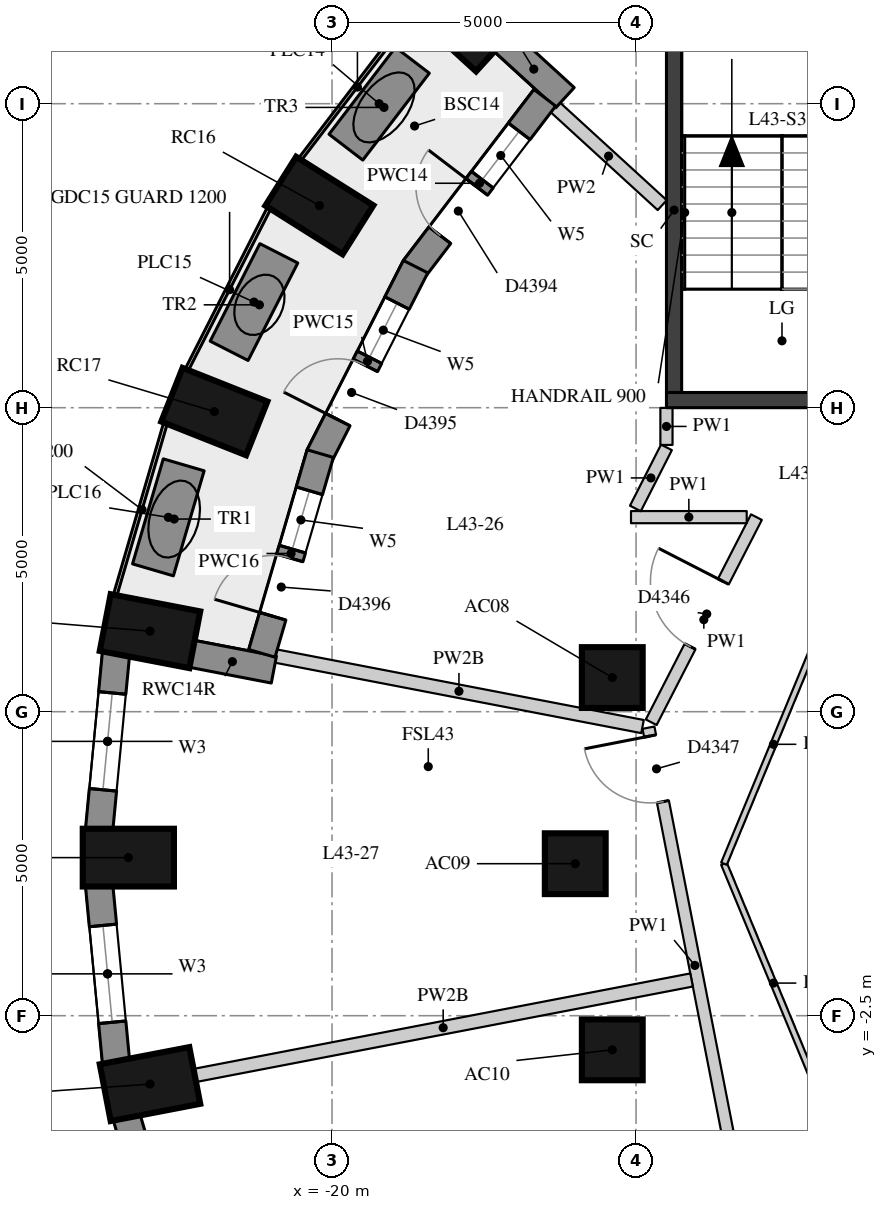
"""IFC4 building model, lengths in metres.
Left out: names, types, materials, properties, quantities, classifications, styles, units other than length and angle.
Written with IfcOpenShell. Run it as: python <this file> out.ifc"""

import sys

from ifc_helpers import new_model, si_unit, direction, frame, frame_2d, origin, origin_2d, place, context, subcontext, project, spatial, rectangle, extrude, element, fill, save


model = new_model("IFC4")
c1 = context("Model", 3, precision=1e-05, world=origin(), true_north=direction((0.0, 1.0)))
c2 = subcontext(c1, "Body", "Model", "MODEL_VIEW")
j1 = project(units=[si_unit("LENGTHUNIT", "METRE"), si_unit("PLANEANGLEUNIT", "RADIAN")], contexts=[c1])
p1 = place(None, origin())
s1 = spatial("IfcSite", under=j1, at=p1, CompositionType="ELEMENT")
p2 = place(p1, origin())
s2 = spatial("IfcBuilding", under=s1, at=p2, CompositionType="ELEMENT")
p3 = place(p2, frame((0.0, 0.0, 155.0)))
s3 = spatial("IfcBuildingStorey", under=s2, at=p3, CompositionType="ELEMENT", Elevation=155.0)
for number, where, z_axis, x_axis in (
    (1, (-17.864, 13.888, 0.0), (0.0, 0.0, 1.0), (-0.738, 0.675, 0.0)),
    (2, (-20.208, 10.825, 0.0), (0.0, 0.0, 1.0), (-0.846, 0.533, 0.0)),
    (3, (-21.936, 7.436, 0.0), (0.0, 0.0, 1.0), (-0.93, 0.369, 0.0)),
    (4, (-22.994, 3.825, 0.0), (0.0, 0.0, 1.0), (-0.982, 0.189, 0.0)),
    (5, (-23.35, 0.1, 0.0), (0.0, 0.0, 1.0), (-1.0, 0.0, 0.0)),
    (6, (-22.994, -3.625, 0.0), (0.0, 0.0, 1.0), (-0.982, -0.189, 0.0)),
):
    element("IfcColumn", number, at=place(p3, frame(where, z_axis=z_axis, x_axis=x_axis)), inside=s3, PredefinedType="COLUMN", context=c2, shape_type="SweptSolid", body=[
        extrude(rectangle(XDim=1.5, YDim=0.95, at=origin_2d()), origin(), (0.0, 0.0, 1.0), 3.3),
    ])
for number, where, z_axis, x_axis in (
    (7, (-15.391, 3.062, 0.0), (0.0, 0.0, 1.0), (1.0, 0.0, 0.0)),
    (8, (-16.0, 0.0, 0.0), (0.0, 0.0, 1.0), (1.0, 0.0, 0.0)),
    (9, (-15.391, -3.062, 0.0), (0.0, 0.0, 1.0), (1.0, 0.0, 0.0)),
):
    element("IfcColumn", number, at=place(p3, frame(where, z_axis=z_axis, x_axis=x_axis)), inside=s3, PredefinedType="COLUMN", context=c2, shape_type="SweptSolid", body=[
        extrude(rectangle(XDim=1.0, YDim=1.0, at=origin_2d()), origin(), (0.0, 0.0, 1.0), 3.3),
    ])
p4 = place(p3, frame((-23.552, 3.469, 0.0), z_axis=(0.0, 0.0, 1.0), x_axis=(-0.095265737322, -0.995451876935, 0.0)))
e10 = element("IfcWall", 10, at=p4, inside=s3, PredefinedType="SOLIDWALL", context=c2, shape_type="SweptSolid", body=[
    extrude(rectangle(XDim=2.927, YDim=0.45, at=frame_2d((1.463, 0.0))), origin(), (0.0, 0.0, 1.0), 3.02),
])
p5 = place(p4, frame((0.663, 0.0, 0.4)))
e11 = element("IfcOpeningElement", 11, at=p5, cuts=e10, PredefinedType="OPENING", context=c2, shape_type="SweptSolid", body=[
    extrude(rectangle(XDim=1.6, YDim=1.75, at=frame_2d((0.8, 0.875))), frame((0.0, 0.235, 0.0), z_axis=(0.0, -1.0, 0.0), x_axis=(1.0, 0.0, 0.0)), (0.0, 0.0, 1.0), 0.47),
])
p6 = place(p3, frame((-23.831, -0.355, 0.0), z_axis=(0.0, 0.0, 1.0), x_axis=(0.095257827044, -0.995452633924, 0.0)))
e12 = element("IfcWall", 12, at=p6, inside=s3, PredefinedType="SOLIDWALL", context=c2, shape_type="SweptSolid", body=[
    extrude(rectangle(XDim=2.927, YDim=0.45, at=frame_2d((1.463, 0.0))), origin(), (0.0, 0.0, 1.0), 3.02),
])
p7 = place(p6, frame((0.663, 0.0, 0.4)))
e13 = element("IfcOpeningElement", 13, at=p7, cuts=e12, PredefinedType="OPENING", context=c2, shape_type="SweptSolid", body=[
    extrude(rectangle(XDim=1.6, YDim=1.75, at=frame_2d((0.8, 0.875))), frame((0.0, 0.235, 0.0), z_axis=(0.0, -1.0, 0.0), x_axis=(1.0, 0.0, 0.0)), (0.0, 0.0, 1.0), 0.47),
])
p8 = place(p3, frame((-23.38, -4.162, 0.0), z_axis=(0.0, 0.0, 1.0), x_axis=(0.281125768296, -0.959670934435, 0.0)))
e14 = element("IfcWall", 14, at=p8, inside=s3, PredefinedType="SOLIDWALL", context=c2, shape_type="SweptSolid", body=[
    extrude(rectangle(XDim=2.948, YDim=0.45, at=frame_2d((1.474, 0.0))), origin(), (0.0, 0.0, 1.0), 3.02),
])
p9 = place(p8, frame((0.674, 0.0, 0.4)))
e15 = element("IfcOpeningElement", 15, at=p9, cuts=e14, PredefinedType="OPENING", context=c2, shape_type="SweptSolid", body=[
    extrude(rectangle(XDim=1.6, YDim=1.75, at=frame_2d((0.8, 0.875))), frame((0.0, 0.235, 0.0), z_axis=(0.0, -1.0, 0.0), x_axis=(1.0, 0.0, 0.0)), (0.0, 0.0, 1.0), 0.47),
])
p10 = place(p3, frame((-17.195, 13.537, 0.0), z_axis=(0.0, 0.0, 1.0), x_axis=(0.737918885826, -0.674889411638, 0.0)))
e16 = element("IfcWall", 16, at=p10, inside=s3, PredefinedType="SOLIDWALL", context=c2, shape_type="SweptSolid", body=[
    extrude(rectangle(XDim=1.391, YDim=0.45, at=frame_2d((0.695, 0.0))), origin(), (0.0, 0.0, 1.0), 3.02),
])
p11 = place(p3, frame((-22.322, 3.455, 0.0), z_axis=(0.0, 0.0, 1.0), x_axis=(0.982051513278, -0.188612897936, 0.0)))
e17 = element("IfcWall", 17, at=p11, inside=s3, PredefinedType="SOLIDWALL", context=c2, shape_type="SweptSolid", body=[
    extrude(rectangle(XDim=1.39, YDim=0.45, at=frame_2d((0.695, 0.0))), origin(), (0.0, 0.0, 1.0), 2.57),
])
p12 = place(p3, frame((-16.501, 12.598, 0.0), z_axis=(0.0, 0.0, 1.0), x_axis=(-0.606778881252, -0.794870674554, 0.0)))
e18 = element("IfcWall", 18, at=p12, inside=s3, PredefinedType="SOLIDWALL", context=c2, shape_type="SweptSolid", body=[
    extrude(rectangle(XDim=3.538, YDim=0.45, at=frame_2d((1.769, 0.0))), origin(), (0.0, 0.0, 1.0), 3.02),
])
p13 = place(p12, frame((0.694, 0.0, 0.4)))
e19 = element("IfcOpeningElement", 19, at=p13, cuts=e18, PredefinedType="OPENING", context=c2, shape_type="SweptSolid", body=[
    extrude(rectangle(XDim=1.0, YDim=1.75, at=frame_2d((0.5, 0.875))), frame((0.0, 0.235, 0.0), z_axis=(0.0, -1.0, 0.0), x_axis=(1.0, 0.0, 0.0)), (0.0, 0.0, 1.0), 0.47),
])
p14 = place(p12, frame((1.844, 0.0, 0.0)))
e20 = element("IfcOpeningElement", 20, at=p14, cuts=e18, PredefinedType="OPENING", context=c2, shape_type="SweptSolid", body=[
    extrude(rectangle(XDim=1.0, YDim=2.15, at=frame_2d((0.5, 1.075))), frame((0.0, 0.235, 0.0), z_axis=(0.0, -1.0, 0.0), x_axis=(1.0, 0.0, 0.0)), (0.0, 0.0, 1.0), 0.47),
])
p15 = place(p3, frame((-18.626, 9.82, 0.0), z_axis=(0.0, 0.0, 1.0), x_axis=(-0.453241970186, -0.891387523169, 0.0)))
e21 = element("IfcWall", 21, at=p15, inside=s3, PredefinedType="SOLIDWALL", context=c2, shape_type="SweptSolid", body=[
    extrude(rectangle(XDim=3.493, YDim=0.45, at=frame_2d((1.747, 0.0))), origin(), (0.0, 0.0, 1.0), 3.02),
])
p16 = place(p15, frame((0.672, 0.0, 0.4)))
e22 = element("IfcOpeningElement", 22, at=p16, cuts=e21, PredefinedType="OPENING", context=c2, shape_type="SweptSolid", body=[
    extrude(rectangle(XDim=1.0, YDim=1.75, at=frame_2d((0.5, 0.875))), frame((0.0, 0.235, 0.0), z_axis=(0.0, -1.0, 0.0), x_axis=(1.0, 0.0, 0.0)), (0.0, 0.0, 1.0), 0.47),
])
p17 = place(p15, frame((1.822, 0.0, 0.0)))
e23 = element("IfcOpeningElement", 23, at=p17, cuts=e21, PredefinedType="OPENING", context=c2, shape_type="SweptSolid", body=[
    extrude(rectangle(XDim=1.0, YDim=2.15, at=frame_2d((0.5, 1.075))), frame((0.0, 0.235, 0.0), z_axis=(0.0, -1.0, 0.0), x_axis=(1.0, 0.0, 0.0)), (0.0, 0.0, 1.0), 0.47),
])
p18 = place(p3, frame((-20.194, 6.745, 0.0), z_axis=(0.0, 0.0, 1.0), x_axis=(-0.280397139934, -0.959884078375, 0.0)))
e24 = element("IfcWall", 24, at=p18, inside=s3, PredefinedType="SOLIDWALL", context=c2, shape_type="SweptSolid", body=[
    extrude(rectangle(XDim=3.423, YDim=0.45, at=frame_2d((1.711, 0.0))), origin(), (0.0, 0.0, 1.0), 3.02),
])
p19 = place(p18, frame((0.636, 0.0, 0.4)))
e25 = element("IfcOpeningElement", 25, at=p19, cuts=e24, PredefinedType="OPENING", context=c2, shape_type="SweptSolid", body=[
    extrude(rectangle(XDim=1.0, YDim=1.75, at=frame_2d((0.5, 0.875))), frame((0.0, 0.235, 0.0), z_axis=(0.0, -1.0, 0.0), x_axis=(1.0, 0.0, 0.0)), (0.0, 0.0, 1.0), 0.47),
])
p20 = place(p18, frame((1.786, 0.0, 0.0)))
e26 = element("IfcOpeningElement", 26, at=p20, cuts=e24, PredefinedType="OPENING", context=c2, shape_type="SweptSolid", body=[
    extrude(rectangle(XDim=1.0, YDim=2.15, at=frame_2d((0.5, 1.075))), frame((0.0, 0.235, 0.0), z_axis=(0.0, -1.0, 0.0), x_axis=(1.0, 0.0, 0.0)), (0.0, 0.0, 1.0), 0.47),
])
for number, where, z_axis, x_axis in (
    (27, (-18.678, 13.214, 0.0), (0.0, 0.0, 1.0), (-0.608, -0.794, 0.0)),
    (28, (-20.875, 10.039, 0.0), (0.0, 0.0, 1.0), (-0.454, -0.891, 0.0)),
):
    element("IfcWall", number, at=place(p3, frame(where, z_axis=z_axis, x_axis=x_axis)), inside=s3, PredefinedType="USERDEFINED", context=c2, shape_type="SweptSolid", body=[
        extrude(rectangle(XDim=1.8, YDim=0.7, at=frame_2d((0.9, 0.0))), origin(), (0.0, 0.0, 1.0), 0.75),
    ])
p21 = place(p3, frame((-22.439, 6.56, 0.0), z_axis=(0.0, 0.0, 1.0), x_axis=(-0.281057212968, -0.959691014358, 0.0)))
e29 = element("IfcWall", 29, at=p21, inside=s3, PredefinedType="USERDEFINED", context=c2, shape_type="SweptSolid", body=[
    extrude(rectangle(XDim=1.8, YDim=0.7, at=frame_2d((0.9, 0.0))), origin(), (0.0, 0.0, 1.0), 0.75),
])
p22 = place(p3, frame((-14.375, 7.75, -0.28), z_axis=(0.0, 0.0, 1.0), x_axis=(0.0, 1.0, 0.0)))
e30 = element("IfcWall", 30, at=p22, inside=s3, PredefinedType="SHEAR", context=c2, shape_type="SweptSolid", body=[
    extrude(rectangle(XDim=6.0, YDim=0.25, at=frame_2d((3.0, 0.0))), origin(), (0.0, 0.0, 1.0), 3.3),
])
p23 = place(p3, frame((-14.5, 7.625, -0.28), z_axis=(0.0, 0.0, 1.0), x_axis=(1.0, 0.0, 0.0)))
e31 = element("IfcWall", 31, at=p23, inside=s3, PredefinedType="SHEAR", context=c2, shape_type="SweptSolid", body=[
    extrude(rectangle(XDim=5.2, YDim=0.25, at=frame_2d((2.6, 0.0))), origin(), (0.0, 0.0, 1.0), 3.3),
])
p24 = place(p3, frame((-13.268, -5.583, 0.0), z_axis=(0.0, 0.0, 1.0), x_axis=(-0.191747927029, 0.981444207523, 0.0)))
e32 = element("IfcWall", 32, at=p24, inside=s3, PredefinedType="PARTITIONING", context=c2, shape_type="SweptSolid", body=[
    extrude(rectangle(XDim=7.968, YDim=0.2, at=frame_2d((3.984, 0.0))), origin(), (0.0, 0.0, 1.0), 3.02),
])
p25 = place(p24, frame((6.728, 0.0, 0.0)))
e33 = element("IfcOpeningElement", 33, at=p25, cuts=e32, PredefinedType="OPENING", context=c2, shape_type="SweptSolid", body=[
    extrude(rectangle(XDim=1.1, YDim=2.1, at=frame_2d((0.55, 1.05))), frame((0.0, 0.11, 0.0), z_axis=(0.0, -1.0, 0.0), x_axis=(1.0, 0.0, 0.0)), (0.0, 0.0, 1.0), 0.22),
])
p26 = place(p3, frame((-14.751, 2.326, 0.0), z_axis=(0.0, 0.0, 1.0), x_axis=(0.456461745611, 0.889743038632, 0.0)))
e34 = element("IfcWall", 34, at=p26, inside=s3, PredefinedType="PARTITIONING", context=c2, shape_type="SweptSolid", body=[
    extrude(rectangle(XDim=3.792, YDim=0.2, at=frame_2d((1.896, 0.0))), origin(), (0.0, 0.0, 1.0), 3.02),
])
p27 = place(p26, frame((1.401, 0.0, 0.0)))
e35 = element("IfcOpeningElement", 35, at=p27, cuts=e34, PredefinedType="OPENING", context=c2, shape_type="SweptSolid", body=[
    extrude(rectangle(XDim=1.2, YDim=2.1, at=frame_2d((0.6, 1.05))), frame((0.0, 0.11, 0.0), z_axis=(0.0, -1.0, 0.0), x_axis=(1.0, 0.0, 0.0)), (0.0, 0.0, 1.0), 0.22),
])
p28 = place(p3, frame((-13.18, 5.7, 0.0), z_axis=(0.0, 0.0, 1.0), x_axis=(-1.0, 0.0, 0.0)))
e36 = element("IfcWall", 36, at=p28, inside=s3, PredefinedType="PARTITIONING", context=c2, shape_type="SweptSolid", body=[
    extrude(rectangle(XDim=1.903, YDim=0.2, at=frame_2d((0.952, 0.0))), origin(), (0.0, 0.0, 1.0), 3.02),
])
p29 = place(p3, frame((-15.011, 5.843, 0.0), z_axis=(0.0, 0.0, 1.0), x_axis=(0.453267091839, 0.891374749169, 0.0)))
e37 = element("IfcWall", 37, at=p29, inside=s3, PredefinedType="PARTITIONING", context=c2, shape_type="SweptSolid", body=[
    extrude(rectangle(XDim=1.127, YDim=0.2, at=frame_2d((0.564, 0.0))), origin(), (0.0, 0.0, 1.0), 3.02),
])
p30 = place(p3, frame((-14.5, 6.887, 0.0), z_axis=(0.0, 0.0, 1.0), x_axis=(0.0, 1.0, 0.0)))
e38 = element("IfcWall", 38, at=p30, inside=s3, PredefinedType="PARTITIONING", context=c2, shape_type="SweptSolid", body=[
    extrude(rectangle(XDim=0.609, YDim=0.2, at=frame_2d((0.304, 0.0))), origin(), (0.0, 0.0, 1.0), 3.02),
])
p31 = place(p3, frame((-16.334, 12.445, 0.0), z_axis=(0.0, 0.0, 1.0), x_axis=(0.737857346278, -0.674956692347, 0.0)))
e39 = element("IfcWall", 39, at=p31, inside=s3, PredefinedType="PARTITIONING", context=c2, shape_type="SweptSolid", body=[
    extrude(rectangle(XDim=2.391, YDim=0.22, at=frame_2d((1.195, 0.0))), origin(), (0.0, 0.0, 1.0), 3.02),
])
p32 = place(p3, frame((-20.932, 3.417, 0.0), z_axis=(0.0, 0.0, 1.0), x_axis=(0.9820075798, -0.188841502892, 0.0)))
e40 = element("IfcWall", 40, at=p32, inside=s3, PredefinedType="PARTITIONING", context=c2, shape_type="SweptSolid", body=[
    extrude(rectangle(XDim=6.149, YDim=0.22, at=frame_2d((3.074, 0.0))), origin(), (0.0, 0.0, 1.0), 2.57),
])
p33 = place(p3, frame((-22.257, -3.483, 0.0), z_axis=(0.0, 0.0, 1.0), x_axis=(0.982022559039, 0.188763591666, 0.0)))
e41 = element("IfcWall", 41, at=p33, inside=s3, PredefinedType="PARTITIONING", context=c2, shape_type="SweptSolid", body=[
    extrude(rectangle(XDim=8.32, YDim=0.22, at=frame_2d((4.16, 0.0))), origin(), (0.0, 0.0, 1.0), 2.57),
])
for number, where, z_axis, x_axis in (
    (42, (-11.927, -3.927, 0.0), (0.0, 0.0, 1.0), (-0.383, 0.924, 0.0)),
    (43, (-13.554, 0.0, 0.0), (0.0, 0.0, 1.0), (0.383, 0.924, 0.0)),
):
    element("IfcWall", number, at=place(p3, frame(where, z_axis=z_axis, x_axis=x_axis)), inside=s3, PredefinedType="PARTITIONING", context=c2, shape_type="SweptSolid", body=[
        extrude(rectangle(XDim=4.251, YDim=0.1, at=frame_2d((2.125, 0.0))), origin(), (0.0, 0.0, 1.0), 3.02),
    ])
p34 = place(p5, origin())
e44 = element("IfcWindow", 44, at=p34, inside=s3, PartitioningType="SINGLE_PANEL", PredefinedType="WINDOW", context=c2, shape_type="SweptSolid", body=[
    extrude(rectangle(XDim=1.6, YDim=1.75, at=frame_2d((0.8, 0.875))), frame((0.0, 0.035, 0.0), z_axis=(0.0, -1.0, 0.0), x_axis=(1.0, 0.0, 0.0)), (0.0, 0.0, 1.0), 0.06),
])
fill(e11, e44)
p35 = place(p7, origin())
e45 = element("IfcWindow", 45, at=p35, inside=s3, PartitioningType="SINGLE_PANEL", PredefinedType="WINDOW", context=c2, shape_type="SweptSolid", body=[
    extrude(rectangle(XDim=1.6, YDim=1.75, at=frame_2d((0.8, 0.875))), frame((0.0, 0.035, 0.0), z_axis=(0.0, -1.0, 0.0), x_axis=(1.0, 0.0, 0.0)), (0.0, 0.0, 1.0), 0.06),
])
fill(e13, e45)
p36 = place(p13, origin())
e46 = element("IfcWindow", 46, at=p36, inside=s3, PartitioningType="SINGLE_PANEL", PredefinedType="WINDOW", context=c2, shape_type="SweptSolid", body=[
    extrude(rectangle(XDim=1.0, YDim=1.75, at=frame_2d((0.5, 0.875))), frame((0.0, 0.035, 0.0), z_axis=(0.0, -1.0, 0.0), x_axis=(1.0, 0.0, 0.0)), (0.0, 0.0, 1.0), 0.06),
])
fill(e19, e46)
p37 = place(p14, frame((1.0, 0.0, 0.0), z_axis=(0.0, 0.0, 1.0), x_axis=(-1.0, 0.0, 0.0)))
e47 = element("IfcDoor", 47, at=p37, inside=s3, OperationType="SINGLE_SWING_RIGHT", PredefinedType="DOOR", context=c2, shape_type="SweptSolid", body=[
    extrude(rectangle(XDim=1.0, YDim=2.15, at=frame_2d((0.5, 1.075))), frame((0.0, 0.075, 0.0), z_axis=(0.0, -1.0, 0.0), x_axis=(1.0, 0.0, 0.0)), (0.0, 0.0, 1.0), 0.05),
])
fill(e20, e47)
p38 = place(p16, origin())
e48 = element("IfcWindow", 48, at=p38, inside=s3, PartitioningType="SINGLE_PANEL", PredefinedType="WINDOW", context=c2, shape_type="SweptSolid", body=[
    extrude(rectangle(XDim=1.0, YDim=1.75, at=frame_2d((0.5, 0.875))), frame((0.0, 0.035, 0.0), z_axis=(0.0, -1.0, 0.0), x_axis=(1.0, 0.0, 0.0)), (0.0, 0.0, 1.0), 0.06),
])
fill(e22, e48)
p39 = place(p17, frame((1.0, 0.0, 0.0), z_axis=(0.0, 0.0, 1.0), x_axis=(-1.0, 0.0, 0.0)))
e49 = element("IfcDoor", 49, at=p39, inside=s3, OperationType="SINGLE_SWING_LEFT", PredefinedType="DOOR", context=c2, shape_type="SweptSolid", body=[
    extrude(rectangle(XDim=1.0, YDim=2.15, at=frame_2d((0.5, 1.075))), frame((0.0, 0.075, 0.0), z_axis=(0.0, -1.0, 0.0), x_axis=(1.0, 0.0, 0.0)), (0.0, 0.0, 1.0), 0.05),
])
fill(e23, e49)
p40 = place(p19, origin())
e50 = element("IfcWindow", 50, at=p40, inside=s3, PartitioningType="SINGLE_PANEL", PredefinedType="WINDOW", context=c2, shape_type="SweptSolid", body=[
    extrude(rectangle(XDim=1.0, YDim=1.75, at=frame_2d((0.5, 0.875))), frame((0.0, 0.035, 0.0), z_axis=(0.0, -1.0, 0.0), x_axis=(1.0, 0.0, 0.0)), (0.0, 0.0, 1.0), 0.06),
])
fill(e25, e50)
p41 = place(p20, frame((1.0, 0.0, 0.0), z_axis=(0.0, 0.0, 1.0), x_axis=(-1.0, 0.0, 0.0)))
e51 = element("IfcDoor", 51, at=p41, inside=s3, OperationType="SINGLE_SWING_LEFT", PredefinedType="DOOR", context=c2, shape_type="SweptSolid", body=[
    extrude(rectangle(XDim=1.0, YDim=2.15, at=frame_2d((0.5, 1.075))), frame((0.0, 0.075, 0.0), z_axis=(0.0, -1.0, 0.0), x_axis=(1.0, 0.0, 0.0)), (0.0, 0.0, 1.0), 0.05),
])
fill(e26, e51)
p42 = place(p27, origin())
e52 = element("IfcDoor", 52, at=p42, inside=s3, OperationType="SINGLE_SWING_RIGHT", PredefinedType="DOOR", context=c2, shape_type="SweptSolid", body=[
    extrude(rectangle(XDim=1.2, YDim=2.1, at=frame_2d((0.6, 1.05))), frame((0.0, 0.025, 0.0), z_axis=(0.0, -1.0, 0.0), x_axis=(1.0, 0.0, 0.0)), (0.0, 0.0, 1.0), 0.05),
])
fill(e35, e52)
p43 = place(p25, origin())
e53 = element("IfcDoor", 53, at=p43, inside=s3, OperationType="SINGLE_SWING_RIGHT", PredefinedType="DOOR", context=c2, shape_type="SweptSolid", body=[
    extrude(rectangle(XDim=1.1, YDim=2.1, at=frame_2d((0.55, 1.05))), frame((0.0, 0.025, 0.0), z_axis=(0.0, -1.0, 0.0), x_axis=(1.0, 0.0, 0.0)), (0.0, 0.0, 1.0), 0.05),
])
fill(e33, e53)
save(model, sys.argv[1])
